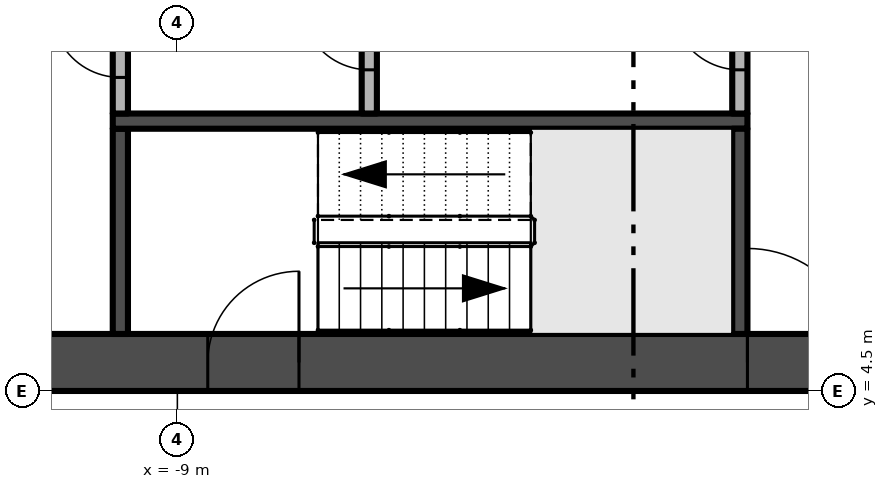
"""IFC4 building model, lengths in metres.
Left out: names, types, materials, properties, quantities, classifications, styles, units other than length and angle.
Written with IfcOpenShell. Run it as: python <this file> out.ifc"""

import sys

from ifc_helpers import new_model, si_unit, direction, frame, frame_2d, origin, place, context, subcontext, project, spatial, rectangle, extrude, element, fill, save


model = new_model("IFC4")
c1 = context("Model", 3, precision=1e-05, world=origin(), true_north=direction((0.0, 1.0)))
c2 = subcontext(c1, "Body", "Model", "MODEL_VIEW")
j1 = project(units=[si_unit("LENGTHUNIT", "METRE"), si_unit("PLANEANGLEUNIT", "RADIAN")], contexts=[c1])
p1 = place(None, origin())
s1 = spatial("IfcSite", under=j1, at=p1, CompositionType="ELEMENT")
p2 = place(p1, origin())
s2 = spatial("IfcBuilding", under=s1, at=p2, CompositionType="ELEMENT")
p3 = place(p2, frame((0.0, 0.0, 170.6)))
s3 = spatial("IfcBuildingStorey", under=s2, at=p3, CompositionType="ELEMENT", Elevation=170.6)
p4 = place(p3, frame((-13.5, 4.875, -0.3), z_axis=(0.0, 0.0, 1.0), x_axis=(1.0, 0.0, 0.0)))
e1 = element("IfcWall", 1, at=p4, inside=s3, PredefinedType="SHEAR", context=c2, shape_type="SweptSolid", body=[
    extrude(rectangle(XDim=27.0, YDim=0.75, at=frame_2d((13.5, 0.0))), origin(), (0.0, 0.0, 1.0), 3.8),
])
p5 = place(p4, frame((12.0, 0.0, 0.3)))
e2 = element("IfcOpeningElement", 2, at=p5, cuts=e1, PredefinedType="OPENING", context=c2, shape_type="SweptSolid", body=[
    extrude(rectangle(XDim=3.0, YDim=2.4, at=frame_2d((1.5, 1.2))), frame((0.0, 0.385, 0.0), z_axis=(0.0, -1.0, 0.0), x_axis=(1.0, 0.0, 0.0)), (0.0, 0.0, 1.0), 0.77),
])
p6 = place(p4, frame((4.9, 0.0, 0.3)))
e3 = element("IfcOpeningElement", 3, at=p6, cuts=e1, PredefinedType="OPENING", context=c2, shape_type="SweptSolid", body=[
    extrude(rectangle(XDim=1.2, YDim=2.2, at=frame_2d((0.6, 1.1))), frame((0.0, 0.385, 0.0), z_axis=(0.0, -1.0, 0.0), x_axis=(1.0, 0.0, 0.0)), (0.0, 0.0, 1.0), 0.77),
])
p7 = place(p4, frame((20.75, 0.0, 0.3)))
e4 = element("IfcOpeningElement", 4, at=p7, cuts=e1, PredefinedType="OPENING", context=c2, shape_type="SweptSolid", body=[
    extrude(rectangle(XDim=1.5, YDim=2.2, at=frame_2d((0.75, 1.1))), frame((0.0, 0.385, 0.0), z_axis=(0.0, -1.0, 0.0), x_axis=(1.0, 0.0, 0.0)), (0.0, 0.0, 1.0), 0.77),
])
p8 = place(p4, frame((17.4, 0.0, 0.3)))
e5 = element("IfcOpeningElement", 5, at=p8, cuts=e1, PredefinedType="OPENING", context=c2, shape_type="SweptSolid", body=[
    extrude(rectangle(XDim=1.2, YDim=2.2, at=frame_2d((0.6, 1.1))), frame((0.0, 0.385, 0.0), z_axis=(0.0, -1.0, 0.0), x_axis=(1.0, 0.0, 0.0)), (0.0, 0.0, 1.0), 0.77),
])
p9 = place(p3, frame((-9.75, 5.25, 0.0), z_axis=(0.0, 0.0, 1.0), x_axis=(0.0, 1.0, 0.0)))
e6 = element("IfcWall", 6, at=p9, inside=s3, PredefinedType="SHEAR", context=c2, shape_type="SweptSolid", body=[
    extrude(rectangle(XDim=2.7, YDim=0.2, at=frame_2d((1.35, 0.0))), origin(), (0.0, 0.0, 1.0), 3.5),
])
p10 = place(p3, frame((-9.85, 8.05, 0.0), z_axis=(0.0, 0.0, 1.0), x_axis=(1.0, 0.0, 0.0)))
e7 = element("IfcWall", 7, at=p10, inside=s3, PredefinedType="SHEAR", context=c2, shape_type="SweptSolid", body=[
    extrude(rectangle(XDim=8.35, YDim=0.2, at=frame_2d((4.175, 0.0))), origin(), (0.0, 0.0, 1.0), 3.5),
])
p11 = place(p3, frame((-9.75, 8.15, 0.0), z_axis=(0.0, 0.0, 1.0), x_axis=(0.0, 1.0, 0.0)))
e8 = element("IfcWall", 8, at=p11, inside=s3, PredefinedType="PARTITIONING", context=c2, shape_type="SweptSolid", body=[
    extrude(rectangle(XDim=1.85, YDim=0.2, at=frame_2d((0.925, 0.0))), origin(), (0.0, 0.0, 1.0), 3.5),
])
p12 = place(p11, frame((0.475, 0.0, 0.0)))
e9 = element("IfcOpeningElement", 9, at=p12, cuts=e8, PredefinedType="OPENING", context=c2, shape_type="SweptSolid", body=[
    extrude(rectangle(XDim=0.9, YDim=2.1, at=frame_2d((0.45, 1.05))), frame((0.0, 0.11, 0.0), z_axis=(0.0, -1.0, 0.0), x_axis=(1.0, 0.0, 0.0)), (0.0, 0.0, 1.0), 0.22),
])
p13 = place(p3, frame((-6.475, 8.15, 0.0), z_axis=(0.0, 0.0, 1.0), x_axis=(0.0, 1.0, 0.0)))
e10 = element("IfcWall", 10, at=p13, inside=s3, PredefinedType="PARTITIONING", context=c2, shape_type="SweptSolid", body=[
    extrude(rectangle(XDim=2.05, YDim=0.2, at=frame_2d((1.025, 0.0))), origin(), (0.0, 0.0, 1.0), 3.5),
])
p14 = place(p13, frame((0.575, 0.0, 0.0)))
e11 = element("IfcOpeningElement", 11, at=p14, cuts=e10, PredefinedType="OPENING", context=c2, shape_type="SweptSolid", body=[
    extrude(rectangle(XDim=0.9, YDim=2.1, at=frame_2d((0.45, 1.05))), frame((0.0, 0.11, 0.0), z_axis=(0.0, -1.0, 0.0), x_axis=(1.0, 0.0, 0.0)), (0.0, 0.0, 1.0), 0.22),
])
p15 = place(p3, frame((-1.6, 5.25, 0.0), z_axis=(0.0, 0.0, 1.0), x_axis=(0.0, 1.0, 0.0)))
e12 = element("IfcWall", 12, at=p15, inside=s3, PredefinedType="SHEAR", context=c2, shape_type="SweptSolid", body=[
    extrude(rectangle(XDim=2.7, YDim=0.2, at=frame_2d((1.35, 0.0))), origin(), (0.0, 0.0, 1.0), 3.5),
])
p16 = place(p3, frame((-1.6, 8.15, 0.0), z_axis=(0.0, 0.0, 1.0), x_axis=(0.0, 1.0, 0.0)))
e13 = element("IfcWall", 13, at=p16, inside=s3, PredefinedType="PARTITIONING", context=c2, shape_type="SweptSolid", body=[
    extrude(rectangle(XDim=2.05, YDim=0.2, at=frame_2d((1.025, 0.0))), origin(), (0.0, 0.0, 1.0), 3.5),
])
p17 = place(p16, frame((0.575, 0.0, 0.0)))
e14 = element("IfcOpeningElement", 14, at=p17, cuts=e13, PredefinedType="OPENING", context=c2, shape_type="SweptSolid", body=[
    extrude(rectangle(XDim=0.9, YDim=2.1, at=frame_2d((0.45, 1.05))), frame((0.0, 0.11, 0.0), z_axis=(0.0, -1.0, 0.0), x_axis=(1.0, 0.0, 0.0)), (0.0, 0.0, 1.0), 0.22),
])
p18 = place(p5, frame((3.0, 0.0, 0.0), z_axis=(0.0, 0.0, 1.0), x_axis=(-1.0, 0.0, 0.0)))
e15 = element("IfcDoor", 15, at=p18, inside=s3, OperationType="DOUBLE_DOOR_SINGLE_SWING", PredefinedType="DOOR", context=c2, shape_type="SweptSolid", body=[
    extrude(rectangle(XDim=3.0, YDim=2.4, at=frame_2d((1.5, 1.2))), frame((0.0, 0.025, 0.0), z_axis=(0.0, -1.0, 0.0), x_axis=(1.0, 0.0, 0.0)), (0.0, 0.0, 1.0), 0.05),
])
fill(e2, e15)
p19 = place(p6, frame((1.2, 0.0, 0.0), z_axis=(0.0, 0.0, 1.0), x_axis=(-1.0, 0.0, 0.0)))
e16 = element("IfcDoor", 16, at=p19, inside=s3, OperationType="SINGLE_SWING_LEFT", PredefinedType="DOOR", context=c2, shape_type="SweptSolid", body=[
    extrude(rectangle(XDim=1.2, YDim=2.2, at=frame_2d((0.6, 1.1))), frame((0.0, 0.025, 0.0), z_axis=(0.0, -1.0, 0.0), x_axis=(1.0, 0.0, 0.0)), (0.0, 0.0, 1.0), 0.05),
])
fill(e3, e16)
p20 = place(p17, origin())
e17 = element("IfcDoor", 17, at=p20, inside=s3, OperationType="SINGLE_SWING_RIGHT", PredefinedType="DOOR", context=c2, shape_type="SweptSolid", body=[
    extrude(rectangle(XDim=0.9, YDim=2.1, at=frame_2d((0.45, 1.05))), frame((0.0, 0.025, 0.0), z_axis=(0.0, -1.0, 0.0), x_axis=(1.0, 0.0, 0.0)), (0.0, 0.0, 1.0), 0.05),
])
fill(e14, e17)
p21 = place(p14, origin())
e18 = element("IfcDoor", 18, at=p21, inside=s3, OperationType="SINGLE_SWING_RIGHT", PredefinedType="DOOR", context=c2, shape_type="SweptSolid", body=[
    extrude(rectangle(XDim=0.9, YDim=2.1, at=frame_2d((0.45, 1.05))), frame((0.0, 0.025, 0.0), z_axis=(0.0, -1.0, 0.0), x_axis=(1.0, 0.0, 0.0)), (0.0, 0.0, 1.0), 0.05),
])
fill(e11, e18)
p22 = place(p12, origin())
e19 = element("IfcDoor", 19, at=p22, inside=s3, OperationType="SINGLE_SWING_RIGHT", PredefinedType="DOOR", context=c2, shape_type="SweptSolid", body=[
    extrude(rectangle(XDim=0.9, YDim=2.1, at=frame_2d((0.45, 1.05))), frame((0.0, 0.025, 0.0), z_axis=(0.0, -1.0, 0.0), x_axis=(1.0, 0.0, 0.0)), (0.0, 0.0, 1.0), 0.05),
])
fill(e9, e19)
save(model, sys.argv[1])
